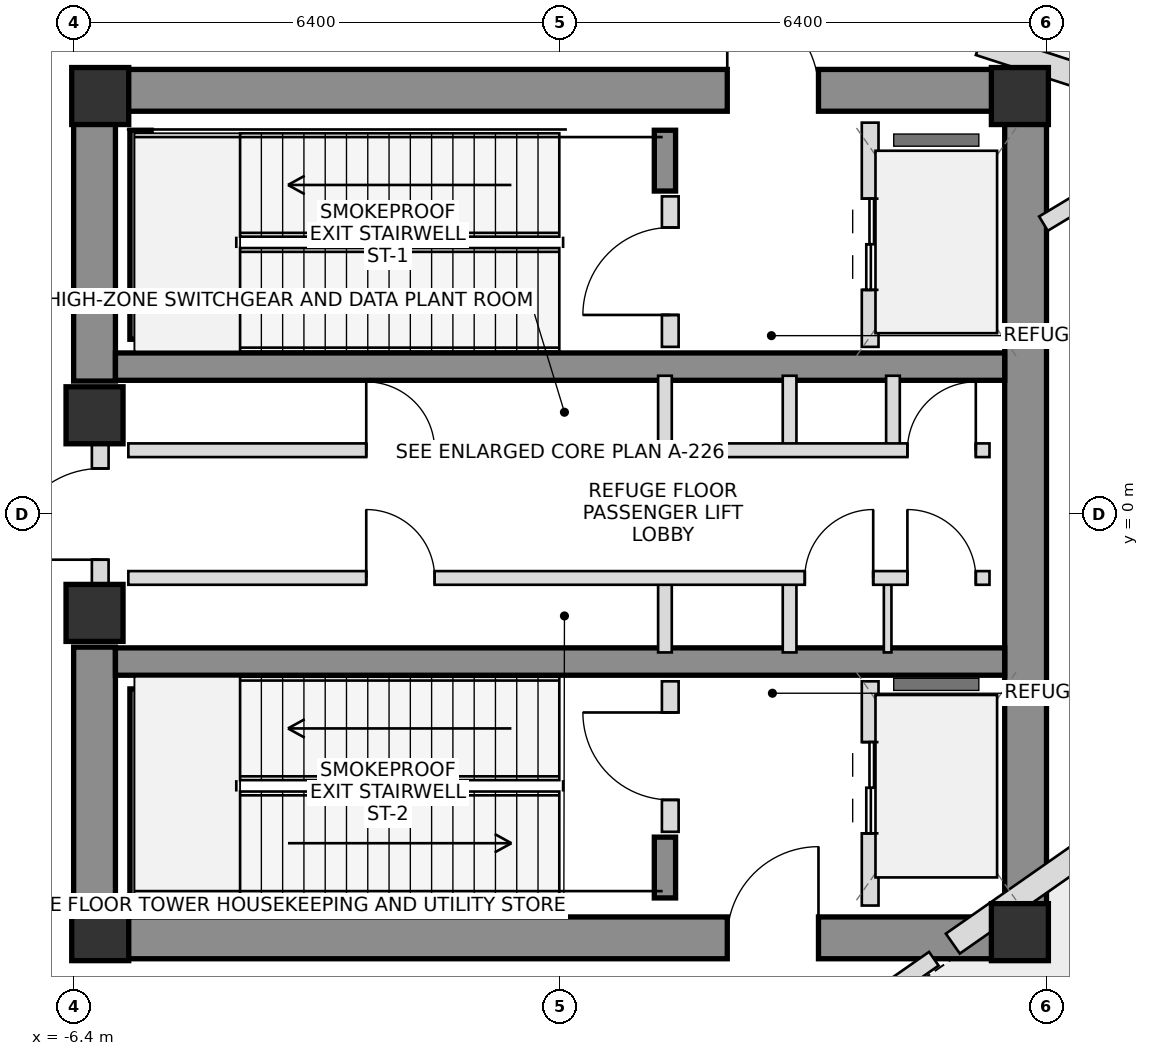
"""IFC4 building model, lengths in metres.
Left out: names, types, materials, properties, quantities, classifications, styles, units other than length and angle.
Written with IfcOpenShell. Run it as: python <this file> out.ifc"""

import sys

from ifc_helpers import new_model, si_unit, direction, frame, frame_2d, origin, origin_2d, place, context, subcontext, project, spatial, rectangle, extrude, source, transform, mapped, element, fill, save


model = new_model("IFC4")
c1 = context("Model", 3, precision=1e-05, world=origin(), true_north=direction((0.0, 1.0)))
c2 = subcontext(c1, "Body", "Model", "MODEL_VIEW")
j1 = project(units=[si_unit("LENGTHUNIT", "METRE"), si_unit("PLANEANGLEUNIT", "RADIAN")], contexts=[c1])
p1 = place(None, origin())
s1 = spatial("IfcSite", under=j1, at=p1, CompositionType="ELEMENT")
p2 = place(p1, origin())
s2 = spatial("IfcBuilding", under=s1, at=p2, CompositionType="ELEMENT")
p3 = place(p2, frame((0.0, 0.0, 284.75)))
s3 = spatial("IfcBuildingStorey", under=s2, at=p3, CompositionType="ELEMENT", Elevation=284.75)
m1 = source(origin(), c2, "Body", "SweptSolid", [
    extrude(rectangle(XDim=0.75, YDim=0.75, at=origin_2d()), origin(), (0.0, 0.0, 1.0), 5.1),
])
for number, where, z_axis, x_axis in (
    (1, (-6.05, -5.5, 0.0), (0.0, 0.0, 1.0), (1.0, 0.0, 0.0)),
    (2, (6.05, -5.5, 0.0), (0.0, 0.0, 1.0), (1.0, 0.0, 0.0)),
    (3, (6.05, 5.5, 0.0), (0.0, 0.0, 1.0), (1.0, 0.0, 0.0)),
    (4, (-6.05, 5.5, 0.0), (0.0, 0.0, 1.0), (1.0, 0.0, 0.0)),
):
    element("IfcColumn", number, at=place(p3, frame(where, z_axis=z_axis, x_axis=x_axis)), inside=s3, PredefinedType="COLUMN", context=c2, shape_type="MappedRepresentation", body=[
        mapped(m1, transform((0.0, 0.0, 0.0), scale=1.0)),
    ])
p4 = place(p3, frame((-6.4, 5.575, 0.0), z_axis=(0.0, 0.0, 1.0), x_axis=(1.0, 0.0, 0.0)))
e5 = element("IfcWall", 5, at=p4, inside=s3, PredefinedType="SHEAR", context=c2, shape_type="SweptSolid", body=[
    extrude(rectangle(XDim=12.8, YDim=0.55, at=frame_2d((6.4, 0.0))), origin(), (0.0, 0.0, 1.0), 5.1),
])
p5 = place(p4, frame((8.6, 0.0, 0.0)))
e6 = element("IfcOpeningElement", 6, at=p5, cuts=e5, PredefinedType="OPENING", context=c2, shape_type="SweptSolid", body=[
    extrude(rectangle(XDim=1.2, YDim=2.2, at=frame_2d((0.6, 1.1))), frame((0.0, 0.285, 0.0), z_axis=(0.0, -1.0, 0.0), x_axis=(1.0, 0.0, 0.0)), (0.0, 0.0, 1.0), 0.57),
])
p6 = place(p3, frame((-6.4, -5.575, 0.0), z_axis=(0.0, 0.0, 1.0), x_axis=(1.0, 0.0, 0.0)))
e7 = element("IfcWall", 7, at=p6, inside=s3, PredefinedType="SHEAR", context=c2, shape_type="SweptSolid", body=[
    extrude(rectangle(XDim=12.8, YDim=0.55, at=frame_2d((6.4, 0.0))), origin(), (0.0, 0.0, 1.0), 5.1),
])
p7 = place(p6, frame((8.6, 0.0, 0.0)))
e8 = element("IfcOpeningElement", 8, at=p7, cuts=e7, PredefinedType="OPENING", context=c2, shape_type="SweptSolid", body=[
    extrude(rectangle(XDim=1.2, YDim=2.2, at=frame_2d((0.6, 1.1))), frame((0.0, 0.285, 0.0), z_axis=(0.0, -1.0, 0.0), x_axis=(1.0, 0.0, 0.0)), (0.0, 0.0, 1.0), 0.57),
])
p8 = place(p3, frame((6.125, -5.3, 0.0), z_axis=(0.0, 0.0, 1.0), x_axis=(0.0, 1.0, 0.0)))
e9 = element("IfcWall", 9, at=p8, inside=s3, PredefinedType="SHEAR", context=c2, shape_type="SweptSolid", body=[
    extrude(rectangle(XDim=10.6, YDim=0.55, at=frame_2d((5.3, 0.0))), origin(), (0.0, 0.0, 1.0), 5.1),
])
for number, where, z_axis, x_axis in (
    (10, (-6.125, -5.3, 0.0), (0.0, 0.0, 1.0), (0.0, 1.0, 0.0)),
    (11, (-6.125, 1.75, 0.0), (0.0, 0.0, 1.0), (0.0, 1.0, 0.0)),
):
    element("IfcWall", number, at=place(p3, frame(where, z_axis=z_axis, x_axis=x_axis)), inside=s3, PredefinedType="SHEAR", context=c2, shape_type="SweptSolid", body=[
        extrude(rectangle(XDim=3.55, YDim=0.55, at=frame_2d((1.775, 0.0))), origin(), (0.0, 0.0, 1.0), 5.1),
    ])
for number, where, z_axis, x_axis in (
    (12, (-5.85, 1.94, 0.0), (0.0, 0.0, 1.0), (1.0, 0.0, 0.0)),
    (13, (-5.85, -1.94, 0.0), (0.0, 0.0, 1.0), (1.0, 0.0, 0.0)),
):
    element("IfcWall", number, at=place(p3, frame(where, z_axis=z_axis, x_axis=x_axis)), inside=s3, PredefinedType="SHEAR", context=c2, shape_type="SweptSolid", body=[
        extrude(rectangle(XDim=11.7, YDim=0.36, at=frame_2d((5.85, 0.0))), origin(), (0.0, 0.0, 1.0), 5.1),
    ])
p9 = place(p3, frame((-5.52, 2.3, 0.0), z_axis=(0.0, 0.0, 1.0), x_axis=(0.0, 1.0, 0.0)))
e14 = element("IfcWall", 14, at=p9, inside=s3, PredefinedType="SHEAR", context=c2, shape_type="SweptSolid", body=[
    extrude(rectangle(XDim=2.75, YDim=0.28, at=frame_2d((1.375, 0.0))), origin(), (0.0, 0.0, 1.0), 5.1),
])
p10 = place(p3, frame((1.38, 4.25, 0.0), z_axis=(0.0, 0.0, 1.0), x_axis=(0.0, 1.0, 0.0)))
e15 = element("IfcWall", 15, at=p10, inside=s3, PredefinedType="SHEAR", context=c2, shape_type="SweptSolid", body=[
    extrude(rectangle(XDim=0.8, YDim=0.28, at=frame_2d((0.4, 0.0))), origin(), (0.0, 0.0, 1.0), 5.1),
])
p11 = place(p3, frame((-5.52, -5.05, 0.0), z_axis=(0.0, 0.0, 1.0), x_axis=(0.0, 1.0, 0.0)))
e16 = element("IfcWall", 16, at=p11, inside=s3, PredefinedType="SHEAR", context=c2, shape_type="SweptSolid", body=[
    extrude(rectangle(XDim=2.75, YDim=0.28, at=frame_2d((1.375, 0.0))), origin(), (0.0, 0.0, 1.0), 5.1),
])
p12 = place(p3, frame((1.38, -5.05, 0.0), z_axis=(0.0, 0.0, 1.0), x_axis=(0.0, 1.0, 0.0)))
e17 = element("IfcWall", 17, at=p12, inside=s3, PredefinedType="SHEAR", context=c2, shape_type="SweptSolid", body=[
    extrude(rectangle(XDim=0.8, YDim=0.28, at=frame_2d((0.4, 0.0))), origin(), (0.0, 0.0, 1.0), 5.1),
])
for number, where, z_axis, x_axis in (
    (18, (-6.125, -1.3, 0.0), (0.0, 0.0, 1.0), (1.0, 0.0, 0.0)),
    (19, (-6.125, 1.3, 0.0), (0.0, 0.0, 1.0), (1.0, 0.0, 0.0)),
):
    element("IfcColumn", number, at=place(p3, frame(where, z_axis=z_axis, x_axis=x_axis)), inside=s3, PredefinedType="COLUMN", context=c2, shape_type="MappedRepresentation", body=[
        mapped(m1, transform((0.0, 0.0, 0.0), scale=1.0)),
    ])
p13 = place(p3, frame((-6.05, -0.95, 0.0), z_axis=(0.0, 0.0, 1.0), x_axis=(0.0, 1.0, 0.0)))
e20 = element("IfcWall", 20, at=p13, inside=s3, PredefinedType="PLUMBINGWALL", context=c2, shape_type="SweptSolid", body=[
    extrude(rectangle(XDim=1.9, YDim=0.22, at=frame_2d((0.95, 0.0))), origin(), (0.0, 0.0, 1.0), 3.88),
])
p14 = place(p13, frame((0.35, 0.0, 0.0)))
e21 = element("IfcOpeningElement", 21, at=p14, cuts=e20, PredefinedType="OPENING", context=c2, shape_type="SweptSolid", body=[
    extrude(rectangle(XDim=1.2, YDim=2.2, at=frame_2d((0.6, 1.1))), frame((0.0, 0.12, 0.0), z_axis=(0.0, -1.0, 0.0), x_axis=(1.0, 0.0, 0.0)), (0.0, 0.0, 1.0), 0.24),
])
p15 = place(p3, frame((1.45, 2.2, 0.0), z_axis=(0.0, 0.0, 1.0), x_axis=(0.0, 1.0, 0.0)))
e22 = element("IfcWall", 22, at=p15, inside=s3, PredefinedType="PLUMBINGWALL", context=c2, shape_type="SweptSolid", body=[
    extrude(rectangle(XDim=1.98, YDim=0.22, at=frame_2d((0.99, 0.0))), origin(), (0.0, 0.0, 1.0), 4.9),
])
p16 = place(p15, frame((0.42, 0.0, 0.0)))
e23 = element("IfcOpeningElement", 23, at=p16, cuts=e22, PredefinedType="OPENING", context=c2, shape_type="SweptSolid", body=[
    extrude(rectangle(XDim=1.15, YDim=2.15, at=frame_2d((0.575, 1.075))), frame((0.0, 0.12, 0.0), z_axis=(0.0, -1.0, 0.0), x_axis=(1.0, 0.0, 0.0)), (0.0, 0.0, 1.0), 0.24),
])
p17 = place(p3, frame((4.08, 2.2, 0.0), z_axis=(0.0, 0.0, 1.0), x_axis=(0.0, 1.0, 0.0)))
e24 = element("IfcWall", 24, at=p17, inside=s3, PredefinedType="PLUMBINGWALL", context=c2, shape_type="SweptSolid", body=[
    extrude(rectangle(XDim=2.95, YDim=0.22, at=frame_2d((1.475, 0.0))), origin(), (0.0, 0.0, 1.0), 4.9),
])
p18 = place(p17, frame((0.75, 0.0, 0.0)))
e25 = element("IfcOpeningElement", 25, at=p18, cuts=e24, PredefinedType="OPENING", context=c2, shape_type="SweptSolid", body=[
    extrude(rectangle(XDim=1.2, YDim=2.25, at=frame_2d((0.6, 1.125))), frame((0.0, 0.12, 0.0), z_axis=(0.0, -1.0, 0.0), x_axis=(1.0, 0.0, 0.0)), (0.0, 0.0, 1.0), 0.24),
])
p19 = place(p3, frame((1.45, -4.18, 0.0), z_axis=(0.0, 0.0, 1.0), x_axis=(0.0, 1.0, 0.0)))
e26 = element("IfcWall", 26, at=p19, inside=s3, PredefinedType="PLUMBINGWALL", context=c2, shape_type="SweptSolid", body=[
    extrude(rectangle(XDim=1.98, YDim=0.22, at=frame_2d((0.99, 0.0))), origin(), (0.0, 0.0, 1.0), 4.9),
])
p20 = place(p19, frame((0.42, 0.0, 0.0)))
e27 = element("IfcOpeningElement", 27, at=p20, cuts=e26, PredefinedType="OPENING", context=c2, shape_type="SweptSolid", body=[
    extrude(rectangle(XDim=1.15, YDim=2.15, at=frame_2d((0.575, 1.075))), frame((0.0, 0.12, 0.0), z_axis=(0.0, -1.0, 0.0), x_axis=(1.0, 0.0, 0.0)), (0.0, 0.0, 1.0), 0.24),
])
p21 = place(p3, frame((4.08, -5.15, 0.0), z_axis=(0.0, 0.0, 1.0), x_axis=(0.0, 1.0, 0.0)))
e28 = element("IfcWall", 28, at=p21, inside=s3, PredefinedType="PLUMBINGWALL", context=c2, shape_type="SweptSolid", body=[
    extrude(rectangle(XDim=2.95, YDim=0.22, at=frame_2d((1.475, 0.0))), origin(), (0.0, 0.0, 1.0), 4.9),
])
p22 = place(p21, frame((0.95, 0.0, 0.0)))
e29 = element("IfcOpeningElement", 29, at=p22, cuts=e28, PredefinedType="OPENING", context=c2, shape_type="SweptSolid", body=[
    extrude(rectangle(XDim=1.2, YDim=2.25, at=frame_2d((0.6, 1.125))), frame((0.0, 0.12, 0.0), z_axis=(0.0, -1.0, 0.0), x_axis=(1.0, 0.0, 0.0)), (0.0, 0.0, 1.0), 0.24),
])
for number, where, z_axis, x_axis in (
    (30, (1.38, 0.84, 0.0), (0.0, 0.0, 1.0), (0.0, 1.0, 0.0)),
    (31, (1.38, -1.82, 0.0), (0.0, 0.0, 1.0), (0.0, 1.0, 0.0)),
    (32, (3.02, 0.84, 0.0), (0.0, 0.0, 1.0), (0.0, 1.0, 0.0)),
    (33, (4.38, 0.84, 0.0), (0.0, 0.0, 1.0), (0.0, 1.0, 0.0)),
    (34, (3.02, -1.82, 0.0), (0.0, 0.0, 1.0), (0.0, 1.0, 0.0)),
):
    element("IfcWall", number, at=place(p3, frame(where, z_axis=z_axis, x_axis=x_axis)), inside=s3, PredefinedType="PLUMBINGWALL", context=c2, shape_type="SweptSolid", body=[
        extrude(rectangle(XDim=0.98, YDim=0.18, at=frame_2d((0.49, 0.0))), origin(), (0.0, 0.0, 1.0), 4.9),
    ])
p23 = place(p3, frame((4.31, -1.82, 0.0), z_axis=(0.0, 0.0, 1.0), x_axis=(0.0, 1.0, 0.0)))
e35 = element("IfcWall", 35, at=p23, inside=s3, PredefinedType="PARTITIONING", context=c2, shape_type="SweptSolid", body=[
    extrude(rectangle(XDim=0.98, YDim=0.1, at=frame_2d((0.49, 0.0))), origin(), (0.0, 0.0, 1.0), 4.9),
])
p24 = place(p3, frame((-5.68, 0.84, 0.0), z_axis=(0.0, 0.0, 1.0), x_axis=(1.0, 0.0, 0.0)))
e36 = element("IfcWall", 36, at=p24, inside=s3, PredefinedType="PLUMBINGWALL", context=c2, shape_type="SweptSolid", body=[
    extrude(rectangle(XDim=11.33, YDim=0.18, at=frame_2d((5.665, 0.0))), origin(), (0.0, 0.0, 1.0), 4.9),
])
p25 = place(p24, frame((3.13, 0.0, 0.0)))
e37 = element("IfcOpeningElement", 37, at=p25, cuts=e36, PredefinedType="OPENING", context=c2, shape_type="SweptSolid", body=[
    extrude(rectangle(XDim=0.9, YDim=2.05, at=frame_2d((0.45, 1.025))), frame((0.0, 0.1, 0.0), z_axis=(0.0, -1.0, 0.0), x_axis=(1.0, 0.0, 0.0)), (0.0, 0.0, 1.0), 0.2),
])
p26 = place(p24, frame((10.25, 0.0, 0.0)))
e38 = element("IfcOpeningElement", 38, at=p26, cuts=e36, PredefinedType="OPENING", context=c2, shape_type="SweptSolid", body=[
    extrude(rectangle(XDim=0.9, YDim=2.05, at=frame_2d((0.45, 1.025))), frame((0.0, 0.1, 0.0), z_axis=(0.0, -1.0, 0.0), x_axis=(1.0, 0.0, 0.0)), (0.0, 0.0, 1.0), 0.2),
])
p27 = place(p3, frame((-5.68, -0.84, 0.0), z_axis=(0.0, 0.0, 1.0), x_axis=(1.0, 0.0, 0.0)))
e39 = element("IfcWall", 39, at=p27, inside=s3, PredefinedType="PLUMBINGWALL", context=c2, shape_type="SweptSolid", body=[
    extrude(rectangle(XDim=11.33, YDim=0.18, at=frame_2d((5.665, 0.0))), origin(), (0.0, 0.0, 1.0), 4.9),
])
p28 = place(p27, frame((3.13, 0.0, 0.0)))
e40 = element("IfcOpeningElement", 40, at=p28, cuts=e39, PredefinedType="OPENING", context=c2, shape_type="SweptSolid", body=[
    extrude(rectangle(XDim=0.9, YDim=2.05, at=frame_2d((0.45, 1.025))), frame((0.0, 0.1, 0.0), z_axis=(0.0, -1.0, 0.0), x_axis=(1.0, 0.0, 0.0)), (0.0, 0.0, 1.0), 0.2),
])
p29 = place(p27, frame((8.9, 0.0, 0.0)))
e41 = element("IfcOpeningElement", 41, at=p29, cuts=e39, PredefinedType="OPENING", context=c2, shape_type="SweptSolid", body=[
    extrude(rectangle(XDim=0.9, YDim=2.05, at=frame_2d((0.45, 1.025))), frame((0.0, 0.1, 0.0), z_axis=(0.0, -1.0, 0.0), x_axis=(1.0, 0.0, 0.0)), (0.0, 0.0, 1.0), 0.2),
])
p30 = place(p27, frame((10.25, 0.0, 0.0)))
e42 = element("IfcOpeningElement", 42, at=p30, cuts=e39, PredefinedType="OPENING", context=c2, shape_type="SweptSolid", body=[
    extrude(rectangle(XDim=0.9, YDim=2.05, at=frame_2d((0.45, 1.025))), frame((0.0, 0.1, 0.0), z_axis=(0.0, -1.0, 0.0), x_axis=(1.0, 0.0, 0.0)), (0.0, 0.0, 1.0), 0.2),
])
p31 = place(p3, frame((8.53, -3.3, 0.0), z_axis=(0.0, 0.0, 1.0), x_axis=(-0.819550503735, -0.573006956177, 0.0)))
e43 = element("IfcWall", 43, at=p31, inside=s3, PredefinedType="SOLIDWALL", context=c2, shape_type="SweptSolid", body=[
    extrude(rectangle(XDim=4.103, YDim=0.32, at=frame_2d((2.051, 0.0))), origin(), (0.0, 0.0, 1.0), 4.305),
])
p32 = place(p3, frame((5.52, 6.192, 0.0), z_axis=(0.0, 0.0, 1.0), x_axis=(0.951258669453, -0.308394137088, 0.0)))
e44 = element("IfcWall", 44, at=p32, inside=s3, PredefinedType="SOLIDWALL", context=c2, shape_type="SweptSolid", body=[
    extrude(rectangle(XDim=3.024, YDim=0.32, at=frame_2d((1.512, 0.0))), origin(), (0.0, 0.0, 1.0), 3.555),
])
p33 = place(p3, frame((6.36, 3.822, 0.0), z_axis=(0.0, 0.0, 1.0), x_axis=(0.857139312481, 0.515084652266, 0.0)))
e45 = element("IfcWall", 45, at=p33, inside=s3, PredefinedType="PLUMBINGWALL", context=c2, shape_type="SweptSolid", body=[
    extrude(rectangle(XDim=2.438, YDim=0.22, at=frame_2d((1.219, 0.0))), origin(), (0.0, 0.0, 1.0), 4.9),
])
p34 = place(p3, frame((4.918, -5.85, 0.0), z_axis=(0.0, 0.0, 1.0), x_axis=(-0.81955637791, -0.572998554472, 0.0)))
e46 = element("IfcWall", 46, at=p34, inside=s3, PredefinedType="PLUMBINGWALL", context=c2, shape_type="SweptSolid", body=[
    extrude(rectangle(XDim=4.276, YDim=0.22, at=frame_2d((2.138, 0.0))), origin(), (0.0, 0.0, 1.0), 4.9),
])
p35 = place(p5, origin())
e47 = element("IfcDoor", 47, at=p35, inside=s3, OperationType="SINGLE_SWING_LEFT", PredefinedType="DOOR", context=c2, shape_type="SweptSolid", body=[
    extrude(rectangle(XDim=1.2, YDim=2.2, at=frame_2d((0.6, 1.1))), frame((0.0, 0.025, 0.0), z_axis=(0.0, -1.0, 0.0), x_axis=(1.0, 0.0, 0.0)), (0.0, 0.0, 1.0), 0.05),
])
fill(e6, e47)
p36 = place(p7, origin())
e48 = element("IfcDoor", 48, at=p36, inside=s3, OperationType="SINGLE_SWING_RIGHT", PredefinedType="DOOR", context=c2, shape_type="SweptSolid", body=[
    extrude(rectangle(XDim=1.2, YDim=2.2, at=frame_2d((0.6, 1.1))), frame((0.0, 0.025, 0.0), z_axis=(0.0, -1.0, 0.0), x_axis=(1.0, 0.0, 0.0)), (0.0, 0.0, 1.0), 0.05),
])
fill(e8, e48)
p37 = place(p14, origin())
e49 = element("IfcDoor", 49, at=p37, inside=s3, OperationType="SINGLE_SWING_LEFT", PredefinedType="DOOR", context=c2, shape_type="SweptSolid", body=[
    extrude(rectangle(XDim=1.2, YDim=2.2, at=frame_2d((0.6, 1.1))), frame((0.0, 0.025, 0.0), z_axis=(0.0, -1.0, 0.0), x_axis=(1.0, 0.0, 0.0)), (0.0, 0.0, 1.0), 0.05),
])
fill(e21, e49)
p38 = place(p16, origin())
e50 = element("IfcDoor", 50, at=p38, inside=s3, OperationType="SINGLE_SWING_LEFT", PredefinedType="DOOR", context=c2, shape_type="SweptSolid", body=[
    extrude(rectangle(XDim=1.15, YDim=2.15, at=frame_2d((0.575, 1.075))), frame((0.0, 0.025, 0.0), z_axis=(0.0, -1.0, 0.0), x_axis=(1.0, 0.0, 0.0)), (0.0, 0.0, 1.0), 0.05),
])
fill(e23, e50)
p39 = place(p18, origin())
e51 = element("IfcDoor", 51, at=p39, inside=s3, OperationType="DOUBLE_DOOR_SLIDING", PredefinedType="DOOR", context=c2, shape_type="SweptSolid", body=[
    extrude(rectangle(XDim=1.2, YDim=2.25, at=frame_2d((0.6, 1.125))), frame((0.0, 0.025, 0.0), z_axis=(0.0, -1.0, 0.0), x_axis=(1.0, 0.0, 0.0)), (0.0, 0.0, 1.0), 0.05),
])
fill(e25, e51)
p40 = place(p20, origin())
e52 = element("IfcDoor", 52, at=p40, inside=s3, OperationType="SINGLE_SWING_RIGHT", PredefinedType="DOOR", context=c2, shape_type="SweptSolid", body=[
    extrude(rectangle(XDim=1.15, YDim=2.15, at=frame_2d((0.575, 1.075))), frame((0.0, 0.025, 0.0), z_axis=(0.0, -1.0, 0.0), x_axis=(1.0, 0.0, 0.0)), (0.0, 0.0, 1.0), 0.05),
])
fill(e27, e52)
p41 = place(p22, origin())
e53 = element("IfcDoor", 53, at=p41, inside=s3, OperationType="DOUBLE_DOOR_SLIDING", PredefinedType="DOOR", context=c2, shape_type="SweptSolid", body=[
    extrude(rectangle(XDim=1.2, YDim=2.25, at=frame_2d((0.6, 1.125))), frame((0.0, 0.025, 0.0), z_axis=(0.0, -1.0, 0.0), x_axis=(1.0, 0.0, 0.0)), (0.0, 0.0, 1.0), 0.05),
])
fill(e29, e53)
p42 = place(p25, origin())
e54 = element("IfcDoor", 54, at=p42, inside=s3, OperationType="SINGLE_SWING_LEFT", PredefinedType="DOOR", context=c2, shape_type="SweptSolid", body=[
    extrude(rectangle(XDim=0.9, YDim=2.05, at=frame_2d((0.45, 1.025))), frame((0.0, 0.025, 0.0), z_axis=(0.0, -1.0, 0.0), x_axis=(1.0, 0.0, 0.0)), (0.0, 0.0, 1.0), 0.05),
])
fill(e37, e54)
p43 = place(p26, origin())
e55 = element("IfcDoor", 55, at=p43, inside=s3, OperationType="SINGLE_SWING_RIGHT", PredefinedType="DOOR", context=c2, shape_type="SweptSolid", body=[
    extrude(rectangle(XDim=0.9, YDim=2.05, at=frame_2d((0.45, 1.025))), frame((0.0, 0.025, 0.0), z_axis=(0.0, -1.0, 0.0), x_axis=(1.0, 0.0, 0.0)), (0.0, 0.0, 1.0), 0.05),
])
fill(e38, e55)
p44 = place(p28, origin())
e56 = element("IfcDoor", 56, at=p44, inside=s3, OperationType="SINGLE_SWING_LEFT", PredefinedType="DOOR", context=c2, shape_type="SweptSolid", body=[
    extrude(rectangle(XDim=0.9, YDim=2.05, at=frame_2d((0.45, 1.025))), frame((0.0, 0.025, 0.0), z_axis=(0.0, -1.0, 0.0), x_axis=(1.0, 0.0, 0.0)), (0.0, 0.0, 1.0), 0.05),
])
fill(e40, e56)
p45 = place(p29, origin())
e57 = element("IfcDoor", 57, at=p45, inside=s3, OperationType="SINGLE_SWING_RIGHT", PredefinedType="DOOR", context=c2, shape_type="SweptSolid", body=[
    extrude(rectangle(XDim=0.9, YDim=2.05, at=frame_2d((0.45, 1.025))), frame((0.0, 0.025, 0.0), z_axis=(0.0, -1.0, 0.0), x_axis=(1.0, 0.0, 0.0)), (0.0, 0.0, 1.0), 0.05),
])
fill(e41, e57)
p46 = place(p30, origin())
e58 = element("IfcDoor", 58, at=p46, inside=s3, OperationType="SINGLE_SWING_LEFT", PredefinedType="DOOR", context=c2, shape_type="SweptSolid", body=[
    extrude(rectangle(XDim=0.9, YDim=2.05, at=frame_2d((0.45, 1.025))), frame((0.0, 0.025, 0.0), z_axis=(0.0, -1.0, 0.0), x_axis=(1.0, 0.0, 0.0)), (0.0, 0.0, 1.0), 0.05),
])
fill(e42, e58)
save(model, sys.argv[1])
